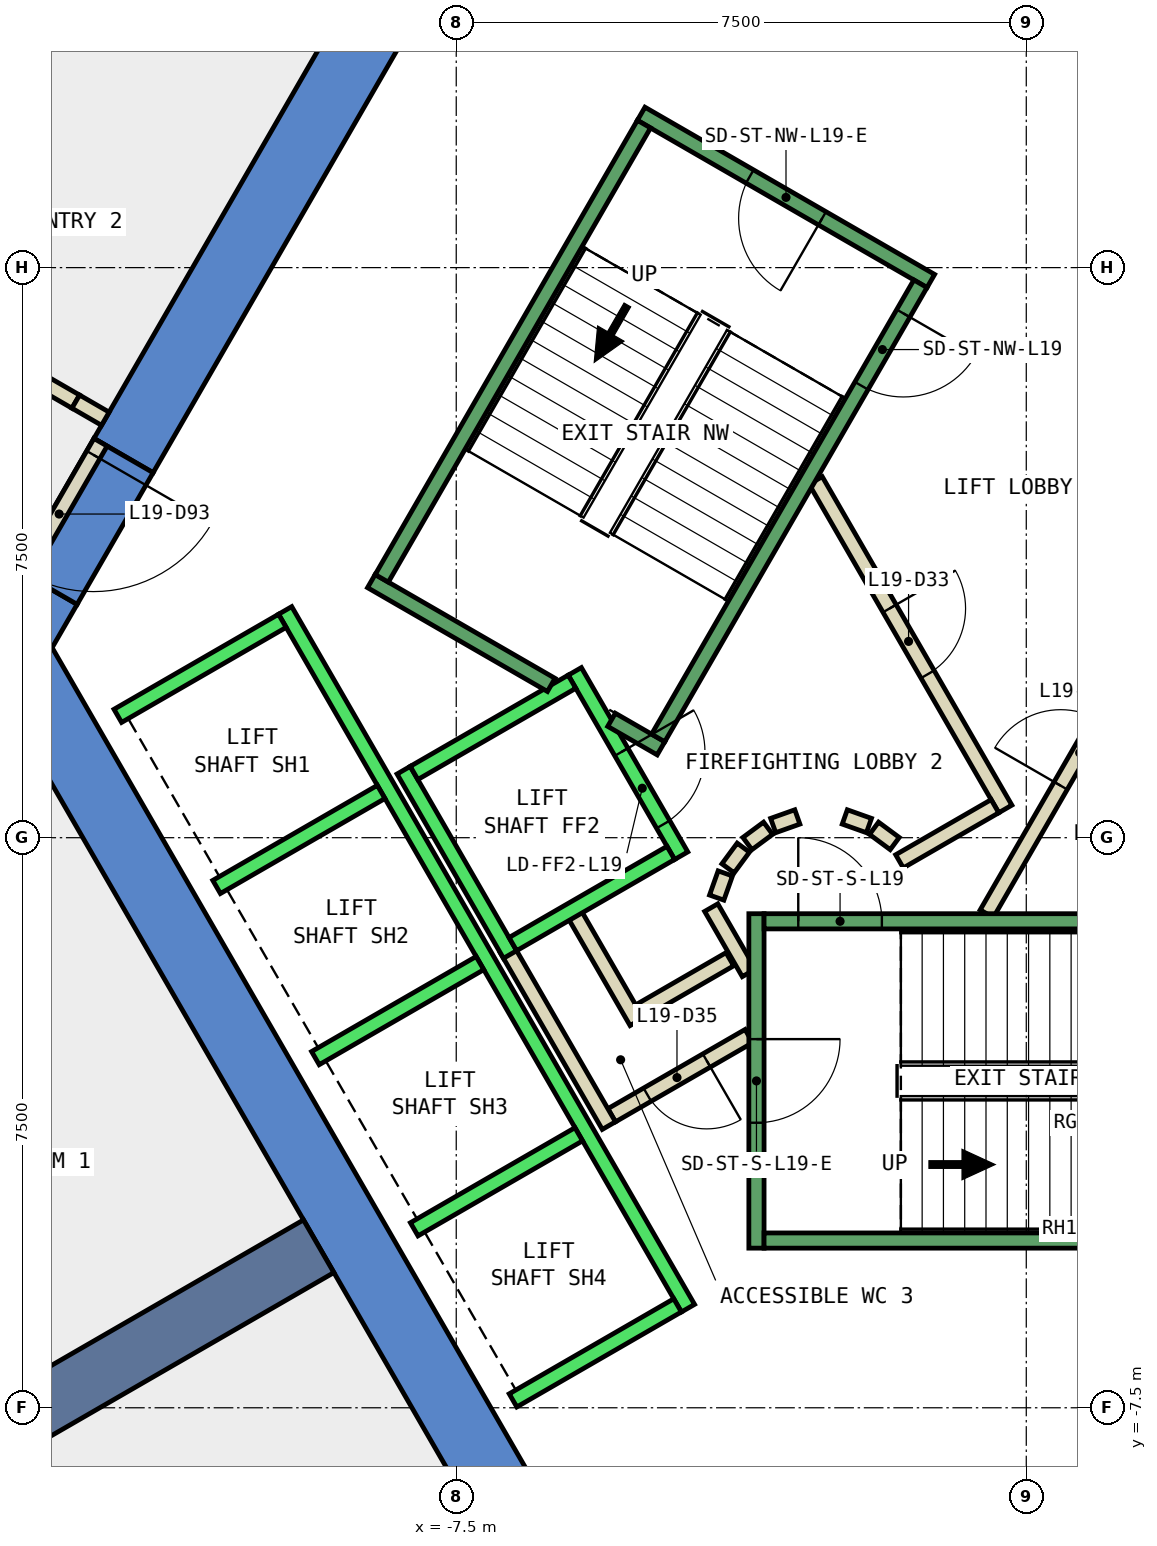
"""IFC4 building model, lengths in metres.
Left out: names, types, materials, properties, quantities, classifications, styles, units other than length and angle.
Written with IfcOpenShell. Run it as: python <this file> out.ifc"""

import sys

from ifc_helpers import new_model, si_unit, direction, frame, frame_2d, origin, place, context, subcontext, project, spatial, polyline, rectangle, outline, extrude, element, fill, save


model = new_model("IFC4")
c1 = context("Model", 3, precision=1e-05, world=origin(), true_north=direction((0.0, 1.0)))
c2 = subcontext(c1, "Body", "Model", "MODEL_VIEW")
j1 = project(units=[si_unit("LENGTHUNIT", "METRE"), si_unit("PLANEANGLEUNIT", "RADIAN")], contexts=[c1])
p1 = place(None, origin())
s1 = spatial("IfcSite", under=j1, at=p1, CompositionType="ELEMENT")
p2 = place(p1, origin())
s2 = spatial("IfcBuilding", under=s1, at=p2, CompositionType="ELEMENT")
p3 = place(p2, frame((0.0, 0.0, 90.8)))
s3 = spatial("IfcBuildingStorey", under=s2, at=p3, CompositionType="ELEMENT", Elevation=90.8)
p4 = place(p3, frame((0.0, 0.0, -0.4)))
e1 = element("IfcWall", 1, at=p4, inside=s3, PredefinedType="SHEAR", context=c2, shape_type="SweptSolid", body=[
    extrude(outline(polyline([(-12.267, 5.252), (-11.488, 4.802), (-6.409, 13.6), (-6.928, 14.5), (-12.267, 5.252)])), origin(), (0.0, 0.0, 1.0), 4.2),
])
p5 = place(p3, frame((0.0, 0.0, -0.4)))
e2 = element("IfcWall", 2, at=p5, inside=s3, PredefinedType="SHEAR", context=c2, shape_type="SweptSolid", body=[
    extrude(outline(polyline([(-12.488, 3.07), (-13.267, 3.52), (-13.856, 2.5), (-12.817, 2.5), (-12.488, 3.07)])), origin(), (0.0, 0.0, 1.0), 4.2),
])
p6 = place(p3, frame((0.0, 0.0, 3.6)))
e3 = element("IfcWall", 3, at=p6, inside=s3, PredefinedType="SHEAR", context=c2, shape_type="SweptSolid", body=[
    extrude(outline(polyline([(-13.267, 3.52), (-12.488, 3.07), (-11.488, 4.802), (-12.267, 5.252), (-13.267, 3.52)])), origin(), (0.0, 0.0, 1.0), 0.2),
])
p7 = place(p3, frame((0.0, 0.0, -0.4)))
e4 = element("IfcWall", 4, at=p7, inside=s3, PredefinedType="SHEAR", context=c2, shape_type="SweptSolid", body=[
    extrude(outline(polyline([(-13.856, 2.5), (-6.928, -9.5), (-6.409, -8.6), (-12.817, 2.5), (-13.856, 2.5)])), origin(), (0.0, 0.0, 1.0), 4.2),
])
p8 = place(p3, frame((-9.31, -5.375, -0.4), z_axis=(0.0, 0.0, 1.0), x_axis=(-0.866017533419, -0.500013631625, 0.0)))
e5 = element("IfcWall", 5, at=p8, inside=s3, PredefinedType="SHEAR", context=c2, shape_type="SweptSolid", body=[
    extrude(rectangle(XDim=9.0, YDim=0.8, at=frame_2d((4.5, 0.0))), origin(), (0.0, 0.0, 1.0), 4.2),
])
p9 = place(p3, frame((-10.797, 14.415, 0.0), z_axis=(0.0, 0.0, 1.0), x_axis=(-0.505008297342, -0.863114488128, 0.0)))
e6 = element("IfcWall", 6, at=p9, inside=s3, PredefinedType="PARTITIONING", context=c2, shape_type="SweptSolid", body=[
    extrude(rectangle(XDim=7.085, YDim=0.2, at=frame_2d((3.542, 0.0))), origin(), (0.0, 0.0, 1.0), 3.8),
])
p10 = place(p9, frame((3.043, 0.0, 0.0)))
e7 = element("IfcOpeningElement", 7, at=p10, cuts=e6, PredefinedType="OPENING", context=c2, shape_type="SweptSolid", body=[
    extrude(rectangle(XDim=1.0, YDim=2.1, at=frame_2d((0.5, 1.05))), frame((0.0, 0.11, 0.0), z_axis=(0.0, -1.0, 0.0), x_axis=(1.0, 0.0, 0.0)), (0.0, 0.0, 1.0), 0.22),
])
p11 = place(p3, frame((-15.098, 7.233, 0.0), z_axis=(0.0, 0.0, 1.0), x_axis=(0.866101363304, -0.499868411168, 0.0)))
e8 = element("IfcWall", 8, at=p11, inside=s3, PredefinedType="PARTITIONING", context=c2, shape_type="SweptSolid", body=[
    extrude(rectangle(XDim=2.992, YDim=0.2, at=frame_2d((1.496, 0.0))), origin(), (0.0, 0.0, 1.0), 3.8),
])
p12 = place(p3, frame((-16.281, 9.4, 0.0), z_axis=(0.0, 0.0, 1.0), x_axis=(0.504973069247, 0.863135099121, 0.0)))
e9 = element("IfcWall", 9, at=p12, inside=s3, PredefinedType="PARTITIONING", context=c2, shape_type="SweptSolid", body=[
    extrude(rectangle(XDim=7.036, YDim=0.2, at=frame_2d((3.518, 0.0))), origin(), (0.0, 0.0, 1.0), 3.8),
])
p13 = place(p3, frame((-3.9, -1.599, 0.0), z_axis=(0.0, 0.0, 1.0), x_axis=(-0.865969445389, -0.500096910261, 0.0)))
e10 = element("IfcWall", 10, at=p13, inside=s3, PredefinedType="PARTITIONING", context=c2, shape_type="SweptSolid", body=[
    extrude(rectangle(XDim=1.373, YDim=0.2, at=frame_2d((0.687, 0.0))), origin(), (0.0, 0.0, 1.0), 3.8),
])
p14 = place(p3, frame((-5.126, -2.422, 0.0), z_axis=(0.0, 0.0, 1.0), x_axis=(-0.500062241894, 0.865989465428, 0.0)))
e11 = element("IfcWall", 11, at=p14, inside=s3, PredefinedType="PARTITIONING", context=c2, shape_type="SweptSolid", body=[
    extrude(rectangle(XDim=1.7, YDim=0.2, at=frame_2d((0.85, 0.0))), origin(), (0.0, 0.0, 1.0), 3.8),
])
p15 = place(p3, frame((-3.65, -2.61, 0.0), z_axis=(0.0, 0.0, 1.0), x_axis=(-0.866072462134, -0.499918483688, 0.0)))
e12 = element("IfcWall", 12, at=p15, inside=s3, PredefinedType="PARTITIONING", context=c2, shape_type="SweptSolid", body=[
    extrude(rectangle(XDim=2.084, YDim=0.2, at=frame_2d((1.042, 0.0))), origin(), (0.0, 0.0, 1.0), 3.8),
])
p16 = place(p15, frame((0.642, 0.0, 0.0)))
e13 = element("IfcOpeningElement", 13, at=p16, cuts=e12, PredefinedType="OPENING", context=c2, shape_type="SweptSolid", body=[
    extrude(rectangle(XDim=0.9, YDim=2.1, at=frame_2d((0.45, 1.05))), frame((0.0, 0.11, 0.0), z_axis=(0.0, -1.0, 0.0), x_axis=(1.0, 0.0, 0.0)), (0.0, 0.0, 1.0), 0.22),
])
p17 = place(p3, frame((-5.492, -3.788, 0.0), z_axis=(0.0, 0.0, 1.0), x_axis=(-0.500008949224, 0.866020236886, 0.0)))
e14 = element("IfcWall", 14, at=p17, inside=s3, PredefinedType="PARTITIONING", context=c2, shape_type="SweptSolid", body=[
    extrude(rectangle(XDim=2.68, YDim=0.2, at=frame_2d((1.34, 0.0))), origin(), (0.0, 0.0, 1.0), 3.8),
])
p18 = place(p3, frame((-4.145, -0.92, 0.0), z_axis=(0.0, 0.0, 1.0), x_axis=(0.499743786207, -0.866173278362, 0.0)))
e15 = element("IfcWall", 15, at=p18, inside=s3, PredefinedType="PARTITIONING", context=c2, shape_type="SweptSolid", body=[
    extrude(rectangle(XDim=0.991, YDim=0.2, at=frame_2d((0.495, 0.0))), origin(), (0.0, 0.0, 1.0), 3.8),
])
p19 = place(p3, frame((-0.52, -1.0, 0.0), z_axis=(0.0, 0.0, 1.0), x_axis=(0.50011622646, 0.865958290007, 0.0)))
e16 = element("IfcWall", 16, at=p19, inside=s3, PredefinedType="PARTITIONING", context=c2, shape_type="SweptSolid", body=[
    extrude(rectangle(XDim=4.991, YDim=0.2, at=frame_2d((2.496, 0.0))), origin(), (0.0, 0.0, 1.0), 3.8),
])
p20 = place(p19, frame((1.945, 0.0, 0.0)))
e17 = element("IfcOpeningElement", 17, at=p20, cuts=e16, PredefinedType="OPENING", context=c2, shape_type="SweptSolid", body=[
    extrude(rectangle(XDim=1.0, YDim=2.1, at=frame_2d((0.5, 1.05))), frame((0.0, 0.11, 0.0), z_axis=(0.0, -1.0, 0.0), x_axis=(1.0, 0.0, 0.0)), (0.0, 0.0, 1.0), 0.22),
])
p21 = place(p3, frame((-2.771, 4.7, 0.0), z_axis=(0.0, 0.0, 1.0), x_axis=(0.499969479948, -0.866043023828, 0.0)))
e18 = element("IfcWall", 18, at=p21, inside=s3, PredefinedType="PARTITIONING", context=c2, shape_type="SweptSolid", body=[
    extrude(rectangle(XDim=4.99, YDim=0.2, at=frame_2d((2.495, 0.0))), origin(), (0.0, 0.0, 1.0), 3.8),
])
p22 = place(p21, frame((1.945, 0.0, 0.0)))
e19 = element("IfcOpeningElement", 19, at=p22, cuts=e18, PredefinedType="OPENING", context=c2, shape_type="SweptSolid", body=[
    extrude(rectangle(XDim=1.0, YDim=2.1, at=frame_2d((0.5, 1.05))), frame((0.0, 0.11, 0.0), z_axis=(0.0, -1.0, 0.0), x_axis=(1.0, 0.0, 0.0)), (0.0, 0.0, 1.0), 0.22),
])
p23 = place(p3, frame((-0.412, 0.414, 0.0), z_axis=(0.0, 0.0, 1.0), x_axis=(-0.866017369001, -0.500013916395, 0.0)))
e20 = element("IfcWall", 20, at=p23, inside=s3, PredefinedType="PARTITIONING", context=c2, shape_type="SweptSolid", body=[
    extrude(rectangle(XDim=1.45, YDim=0.2, at=frame_2d((0.725, 0.0))), origin(), (0.0, 0.0, 1.0), 3.8),
])
p24 = place(p3, frame((-1.731, -0.077, 0.0), z_axis=(0.0, 0.0, 1.0), x_axis=(-0.804311165252, 0.594208338422, 0.0)))
e21 = element("IfcWall", 21, at=p24, inside=s3, PredefinedType="PARTITIONING", context=c2, shape_type="SweptSolid", body=[
    extrude(rectangle(XDim=0.338, YDim=0.2, at=frame_2d((0.169, 0.0))), origin(), (0.0, 0.0, 1.0), 3.8),
])
p25 = place(p3, frame((-2.07, 0.16, 0.0), z_axis=(0.0, 0.0, 1.0), x_axis=(-0.942199461132, 0.335052496547, 0.0)))
e22 = element("IfcWall", 22, at=p25, inside=s3, PredefinedType="PARTITIONING", context=c2, shape_type="SweptSolid", body=[
    extrude(rectangle(XDim=0.337, YDim=0.2, at=frame_2d((0.169, 0.0))), origin(), (0.0, 0.0, 1.0), 3.8),
])
p26 = place(p3, frame((-3.012, 0.273, 0.0), z_axis=(0.0, 0.0, 1.0), x_axis=(-0.942280615813, -0.334824194261, 0.0)))
e23 = element("IfcWall", 23, at=p26, inside=s3, PredefinedType="PARTITIONING", context=c2, shape_type="SweptSolid", body=[
    extrude(rectangle(XDim=0.338, YDim=0.2, at=frame_2d((0.169, 0.0))), origin(), (0.0, 0.0, 1.0), 3.8),
])
p27 = place(p3, frame((-3.397, 0.124, 0.0), z_axis=(0.0, 0.0, 1.0), x_axis=(-0.804311165252, -0.594208338422, 0.0)))
e24 = element("IfcWall", 24, at=p27, inside=s3, PredefinedType="PARTITIONING", context=c2, shape_type="SweptSolid", body=[
    extrude(rectangle(XDim=0.338, YDim=0.2, at=frame_2d((0.169, 0.0))), origin(), (0.0, 0.0, 1.0), 3.8),
])
p28 = place(p3, frame((-3.723, -0.131, 0.0), z_axis=(0.0, 0.0, 1.0), x_axis=(-0.594675113454, -0.803966112121, 0.0)))
e25 = element("IfcWall", 25, at=p28, inside=s3, PredefinedType="PARTITIONING", context=c2, shape_type="SweptSolid", body=[
    extrude(rectangle(XDim=0.338, YDim=0.2, at=frame_2d((0.169, 0.0))), origin(), (0.0, 0.0, 1.0), 3.8),
])
p29 = place(p3, frame((-3.96, -0.47, 0.0), z_axis=(0.0, 0.0, 1.0), x_axis=(-0.334824194261, -0.942280615813, 0.0)))
e26 = element("IfcWall", 26, at=p29, inside=s3, PredefinedType="PARTITIONING", context=c2, shape_type="SweptSolid", body=[
    extrude(rectangle(XDim=0.338, YDim=0.2, at=frame_2d((0.169, 0.0))), origin(), (0.0, 0.0, 1.0), 3.8),
])
p30 = place(p3, frame((-12.18, 5.202, 0.0), z_axis=(0.0, 0.0, 1.0), x_axis=(-0.50002537861, -0.866010750942, 0.0)))
e27 = element("IfcWall", 27, at=p30, inside=s3, PredefinedType="PARTITIONING", context=c2, shape_type="SweptSolid", body=[
    extrude(rectangle(XDim=2.0, YDim=0.2, at=frame_2d((1.0, 0.0))), origin(), (0.0, 0.0, 1.0), 2.4),
])
p31 = place(p30, frame((0.19, 0.0, 0.0)))
e28 = element("IfcOpeningElement", 28, at=p31, cuts=e27, PredefinedType="OPENING", context=c2, shape_type="SweptSolid", body=[
    extrude(rectangle(XDim=1.8, YDim=2.1, at=frame_2d((0.9, 1.05))), frame((0.0, 0.11, 0.0), z_axis=(0.0, -1.0, 0.0), x_axis=(1.0, 0.0, 0.0)), (0.0, 0.0, 1.0), 0.22),
])
p32 = place(p3, frame((-12.506, 5.737, 0.0), z_axis=(0.0, 0.0, 1.0), x_axis=(0.865624510465, -0.500693725627, 0.0)))
e29 = element("IfcWall", 29, at=p32, inside=s3, PredefinedType="PARTITIONING", context=c2, shape_type="SweptSolid", body=[
    extrude(rectangle(XDim=0.449, YDim=0.2, at=frame_2d((0.225, 0.0))), origin(), (0.0, 0.0, 1.0), 2.4),
])
p33 = place(p3, frame((-5.94, 2.188, 0.0), z_axis=(0.0, 0.0, 1.0), x_axis=(0.49994636267, -0.866056369097, 0.0)))
e30 = element("IfcWall", 30, at=p33, inside=s3, PredefinedType="STANDARD", context=c2, shape_type="SweptSolid", body=[
    extrude(rectangle(XDim=2.8, YDim=0.2, at=frame_2d((1.4, 0.0))), origin(), (0.0, 0.0, 1.0), 3.8),
])
p34 = place(p33, frame((1.225, 0.0, 0.0)))
e31 = element("IfcOpeningElement", 31, at=p34, cuts=e30, PredefinedType="OPENING", context=c2, shape_type="SweptSolid", body=[
    extrude(rectangle(XDim=1.1, YDim=2.1, at=frame_2d((0.55, 1.05))), frame((0.0, 0.11, 0.0), z_axis=(0.0, -1.0, 0.0), x_axis=(1.0, 0.0, 0.0)), (0.0, 0.0, 1.0), 0.22),
])
p35 = place(p3, frame((-8.192, 0.888, 0.0), z_axis=(0.0, 0.0, 1.0), x_axis=(0.49994636267, -0.866056369097, 0.0)))
e32 = element("IfcWall", 32, at=p35, inside=s3, PredefinedType="STANDARD", context=c2, shape_type="SweptSolid", body=[
    extrude(rectangle(XDim=2.8, YDim=0.2, at=frame_2d((1.4, 0.0))), origin(), (0.0, 0.0, 1.0), 3.8),
])
for number, where, z_axis, x_axis in (
    (33, (-5.977, 2.052, 0.0), (0.0, 0.0, 1.0), (-0.866, -0.5, 0.0)),
    (34, (-4.677, -0.2, 0.0), (0.0, 0.0, 1.0), (-0.866, -0.5, 0.0)),
):
    element("IfcWall", number, at=place(p3, frame(where, z_axis=z_axis, x_axis=x_axis)), inside=s3, PredefinedType="STANDARD", context=c2, shape_type="SweptSolid", body=[
        extrude(rectangle(XDim=2.399, YDim=0.2, at=frame_2d((1.2, 0.0))), origin(), (0.0, 0.0, 1.0), 3.8),
    ])
p36 = place(p3, frame((-9.751, 2.99, 0.0), z_axis=(0.0, 0.0, 1.0), x_axis=(0.50000090737, -0.866024879913, 0.0)))
e35 = element("IfcWall", 35, at=p36, inside=s3, PredefinedType="STANDARD", context=c2, shape_type="SweptSolid", body=[
    extrude(rectangle(XDim=10.6, YDim=0.2, at=frame_2d((5.3, 0.0))), origin(), (0.0, 0.0, 1.0), 3.8),
])
p37 = place(p3, frame((-9.788, 2.853, 0.0), z_axis=(0.0, 0.0, 1.0), x_axis=(-0.865998541277, -0.500046524342, 0.0)))
e36 = element("IfcWall", 36, at=p37, inside=s3, PredefinedType="STANDARD", context=c2, shape_type="SweptSolid", body=[
    extrude(rectangle(XDim=2.5, YDim=0.2, at=frame_2d((1.25, 0.0))), origin(), (0.0, 0.0, 1.0), 3.8),
])
for number, where, z_axis, x_axis in (
    (37, (-8.488, 0.602, 0.0), (0.0, 0.0, 1.0), (-0.866, -0.5, 0.0)),
    (38, (-7.188, -1.65, 0.0), (0.0, 0.0, 1.0), (-0.866, -0.5, 0.0)),
    (39, (-5.888, -3.902, 0.0), (0.0, 0.0, 1.0), (-0.866, -0.5, 0.0)),
    (40, (-4.588, -6.153, 0.0), (0.0, 0.0, 1.0), (-0.866, -0.5, 0.0)),
):
    element("IfcWall", number, at=place(p3, frame(where, z_axis=z_axis, x_axis=x_axis)), inside=s3, PredefinedType="STANDARD", context=c2, shape_type="SweptSolid", body=[
        extrude(rectangle(XDim=2.5, YDim=0.2, at=frame_2d((1.25, 0.0))), origin(), (0.0, 0.0, 1.0), 3.8),
    ])
p38 = place(p3, frame((-3.55, -1.0, 0.0), z_axis=(0.0, 0.0, 1.0), x_axis=(0.0, -1.0, 0.0)))
e41 = element("IfcWall", 41, at=p38, inside=s3, PredefinedType="STANDARD", context=c2, shape_type="SweptSolid", body=[
    extrude(rectangle(XDim=4.4, YDim=0.2, at=frame_2d((2.2, 0.0))), origin(), (0.0, 0.0, 1.0), 3.8),
])
p39 = place(p38, frame((1.65, 0.0, 0.0)))
e42 = element("IfcOpeningElement", 42, at=p39, cuts=e41, PredefinedType="OPENING", context=c2, shape_type="SweptSolid", body=[
    extrude(rectangle(XDim=1.1, YDim=2.2, at=frame_2d((0.55, 1.1))), frame((0.0, 0.11, 0.0), z_axis=(0.0, -1.0, 0.0), x_axis=(1.0, 0.0, 0.0)), (0.0, 0.0, 1.0), 0.22),
])
p40 = place(p3, frame((-3.45, -1.1, 0.0), z_axis=(0.0, 0.0, 1.0), x_axis=(1.0, 0.0, 0.0)))
e43 = element("IfcWall", 43, at=p40, inside=s3, PredefinedType="STANDARD", context=c2, shape_type="SweptSolid", body=[
    extrude(rectangle(XDim=6.9, YDim=0.2, at=frame_2d((3.45, 0.0))), origin(), (0.0, 0.0, 1.0), 3.8),
])
p41 = place(p40, frame((0.45, 0.0, 0.0)))
e44 = element("IfcOpeningElement", 44, at=p41, cuts=e43, PredefinedType="OPENING", context=c2, shape_type="SweptSolid", body=[
    extrude(rectangle(XDim=1.1, YDim=2.2, at=frame_2d((0.55, 1.1))), frame((0.0, 0.11, 0.0), z_axis=(0.0, -1.0, 0.0), x_axis=(1.0, 0.0, 0.0)), (0.0, 0.0, 1.0), 0.22),
])
p42 = place(p3, frame((-3.45, -5.3, 0.0), z_axis=(0.0, 0.0, 1.0), x_axis=(1.0, 0.0, 0.0)))
e45 = element("IfcWall", 45, at=p42, inside=s3, PredefinedType="STANDARD", context=c2, shape_type="SweptSolid", body=[
    extrude(rectangle(XDim=6.9, YDim=0.2, at=frame_2d((3.45, 0.0))), origin(), (0.0, 0.0, 1.0), 3.8),
])
p43 = place(p3, frame((-1.256, 7.324, 0.0), z_axis=(0.0, 0.0, 1.0), x_axis=(-0.866046073146, 0.499964197906, 0.0)))
e46 = element("IfcWall", 46, at=p43, inside=s3, PredefinedType="STANDARD", context=c2, shape_type="SweptSolid", body=[
    extrude(rectangle(XDim=4.4, YDim=0.2, at=frame_2d((2.2, 0.0))), origin(), (0.0, 0.0, 1.0), 3.8),
])
p44 = place(p43, frame((1.65, 0.0, 0.0)))
e47 = element("IfcOpeningElement", 47, at=p44, cuts=e46, PredefinedType="OPENING", context=c2, shape_type="SweptSolid", body=[
    extrude(rectangle(XDim=1.1, YDim=2.2, at=frame_2d((0.55, 1.1))), frame((0.0, 0.11, 0.0), z_axis=(0.0, -1.0, 0.0), x_axis=(1.0, 0.0, 0.0)), (0.0, 0.0, 1.0), 0.22),
])
p45 = place(p3, frame((-6.25, 2.01, 0.0), z_axis=(0.0, 0.0, 1.0), x_axis=(-0.86611865017, 0.499838457731, 0.0)))
e48 = element("IfcWall", 48, at=p45, inside=s3, PredefinedType="STANDARD", context=c2, shape_type="SweptSolid", body=[
    extrude(rectangle(XDim=2.733, YDim=0.2, at=frame_2d((1.366, 0.0))), origin(), (0.0, 0.0, 1.0), 3.8),
])
p46 = place(p3, frame((-4.806, 1.176, 0.0), z_axis=(0.0, 0.0, 1.0), x_axis=(-0.866558586415, 0.499075361355, 0.0)))
e49 = element("IfcWall", 49, at=p46, inside=s3, PredefinedType="STANDARD", context=c2, shape_type="SweptSolid", body=[
    extrude(rectangle(XDim=0.751, YDim=0.2, at=frame_2d((0.376, 0.0))), origin(), (0.0, 0.0, 1.0), 3.8),
])
p47 = place(p3, frame((-1.393, 7.288, 0.0), z_axis=(0.0, 0.0, 1.0), x_axis=(-0.499963383562, -0.866046543262, 0.0)))
e50 = element("IfcWall", 50, at=p47, inside=s3, PredefinedType="STANDARD", context=c2, shape_type="SweptSolid", body=[
    extrude(rectangle(XDim=6.9, YDim=0.2, at=frame_2d((3.45, 0.0))), origin(), (0.0, 0.0, 1.0), 3.8),
])
p48 = place(p47, frame((0.45, 0.0, 0.0)))
e51 = element("IfcOpeningElement", 51, at=p48, cuts=e50, PredefinedType="OPENING", context=c2, shape_type="SweptSolid", body=[
    extrude(rectangle(XDim=1.1, YDim=2.2, at=frame_2d((0.55, 1.1))), frame((0.0, 0.11, 0.0), z_axis=(0.0, -1.0, 0.0), x_axis=(1.0, 0.0, 0.0)), (0.0, 0.0, 1.0), 0.22),
])
p49 = place(p3, frame((-5.03, 9.388, 0.0), z_axis=(0.0, 0.0, 1.0), x_axis=(-0.499978703459, -0.866037698999, 0.0)))
e52 = element("IfcWall", 52, at=p49, inside=s3, PredefinedType="STANDARD", context=c2, shape_type="SweptSolid", body=[
    extrude(rectangle(XDim=6.9, YDim=0.2, at=frame_2d((3.45, 0.0))), origin(), (0.0, 0.0, 1.0), 3.8),
])
p50 = place(p20, origin())
e53 = element("IfcDoor", 53, at=p50, inside=s3, OperationType="SINGLE_SWING_LEFT", PredefinedType="DOOR", context=c2, shape_type="SweptSolid", body=[
    extrude(rectangle(XDim=1.0, YDim=2.1, at=frame_2d((0.5, 1.05))), frame((0.0, 0.025, 0.0), z_axis=(0.0, -1.0, 0.0), x_axis=(1.0, 0.0, 0.0)), (0.0, 0.0, 1.0), 0.05),
])
fill(e17, e53)
p51 = place(p22, origin())
e54 = element("IfcDoor", 54, at=p51, inside=s3, OperationType="SINGLE_SWING_RIGHT", PredefinedType="DOOR", context=c2, shape_type="SweptSolid", body=[
    extrude(rectangle(XDim=1.0, YDim=2.1, at=frame_2d((0.5, 1.05))), frame((0.0, 0.025, 0.0), z_axis=(0.0, -1.0, 0.0), x_axis=(1.0, 0.0, 0.0)), (0.0, 0.0, 1.0), 0.05),
])
fill(e19, e54)
p52 = place(p16, origin())
e55 = element("IfcDoor", 55, at=p52, inside=s3, OperationType="SINGLE_SWING_LEFT", PredefinedType="DOOR", context=c2, shape_type="SweptSolid", body=[
    extrude(rectangle(XDim=0.9, YDim=2.1, at=frame_2d((0.45, 1.05))), frame((0.0, 0.025, 0.0), z_axis=(0.0, -1.0, 0.0), x_axis=(1.0, 0.0, 0.0)), (0.0, 0.0, 1.0), 0.05),
])
fill(e13, e55)
p53 = place(p31, origin())
e56 = element("IfcDoor", 56, at=p53, inside=s3, OperationType="DOUBLE_DOOR_SINGLE_SWING", PredefinedType="DOOR", context=c2, shape_type="SweptSolid", body=[
    extrude(rectangle(XDim=1.8, YDim=2.1, at=frame_2d((0.9, 1.05))), frame((0.0, 0.025, 0.0), z_axis=(0.0, -1.0, 0.0), x_axis=(1.0, 0.0, 0.0)), (0.0, 0.0, 1.0), 0.05),
])
fill(e28, e56)
p54 = place(p34, origin())
e57 = element("IfcDoor", 57, at=p54, inside=s3, OperationType="SLIDING_TO_LEFT", PredefinedType="DOOR", context=c2, shape_type="SweptSolid", body=[
    extrude(rectangle(XDim=1.1, YDim=2.1, at=frame_2d((0.55, 1.05))), frame((0.0, 0.025, 0.0), z_axis=(0.0, -1.0, 0.0), x_axis=(1.0, 0.0, 0.0)), (0.0, 0.0, 1.0), 0.05),
])
fill(e31, e57)
p55 = place(p41, origin())
e58 = element("IfcDoor", 58, at=p55, inside=s3, OperationType="SINGLE_SWING_LEFT", PredefinedType="DOOR", context=c2, shape_type="SweptSolid", body=[
    extrude(rectangle(XDim=1.1, YDim=2.2, at=frame_2d((0.55, 1.1))), frame((0.0, 0.025, 0.0), z_axis=(0.0, -1.0, 0.0), x_axis=(1.0, 0.0, 0.0)), (0.0, 0.0, 1.0), 0.05),
])
fill(e44, e58)
p56 = place(p39, origin())
e59 = element("IfcDoor", 59, at=p56, inside=s3, OperationType="SINGLE_SWING_LEFT", PredefinedType="DOOR", context=c2, shape_type="SweptSolid", body=[
    extrude(rectangle(XDim=1.1, YDim=2.2, at=frame_2d((0.55, 1.1))), frame((0.0, 0.025, 0.0), z_axis=(0.0, -1.0, 0.0), x_axis=(1.0, 0.0, 0.0)), (0.0, 0.0, 1.0), 0.05),
])
fill(e42, e59)
p57 = place(p48, origin())
e60 = element("IfcDoor", 60, at=p57, inside=s3, OperationType="SINGLE_SWING_LEFT", PredefinedType="DOOR", context=c2, shape_type="SweptSolid", body=[
    extrude(rectangle(XDim=1.1, YDim=2.2, at=frame_2d((0.55, 1.1))), frame((0.0, 0.025, 0.0), z_axis=(0.0, -1.0, 0.0), x_axis=(1.0, 0.0, 0.0)), (0.0, 0.0, 1.0), 0.05),
])
fill(e51, e60)
p58 = place(p44, origin())
e61 = element("IfcDoor", 61, at=p58, inside=s3, OperationType="SINGLE_SWING_LEFT", PredefinedType="DOOR", context=c2, shape_type="SweptSolid", body=[
    extrude(rectangle(XDim=1.1, YDim=2.2, at=frame_2d((0.55, 1.1))), frame((0.0, 0.025, 0.0), z_axis=(0.0, -1.0, 0.0), x_axis=(1.0, 0.0, 0.0)), (0.0, 0.0, 1.0), 0.05),
])
fill(e47, e61)
save(model, sys.argv[1])
